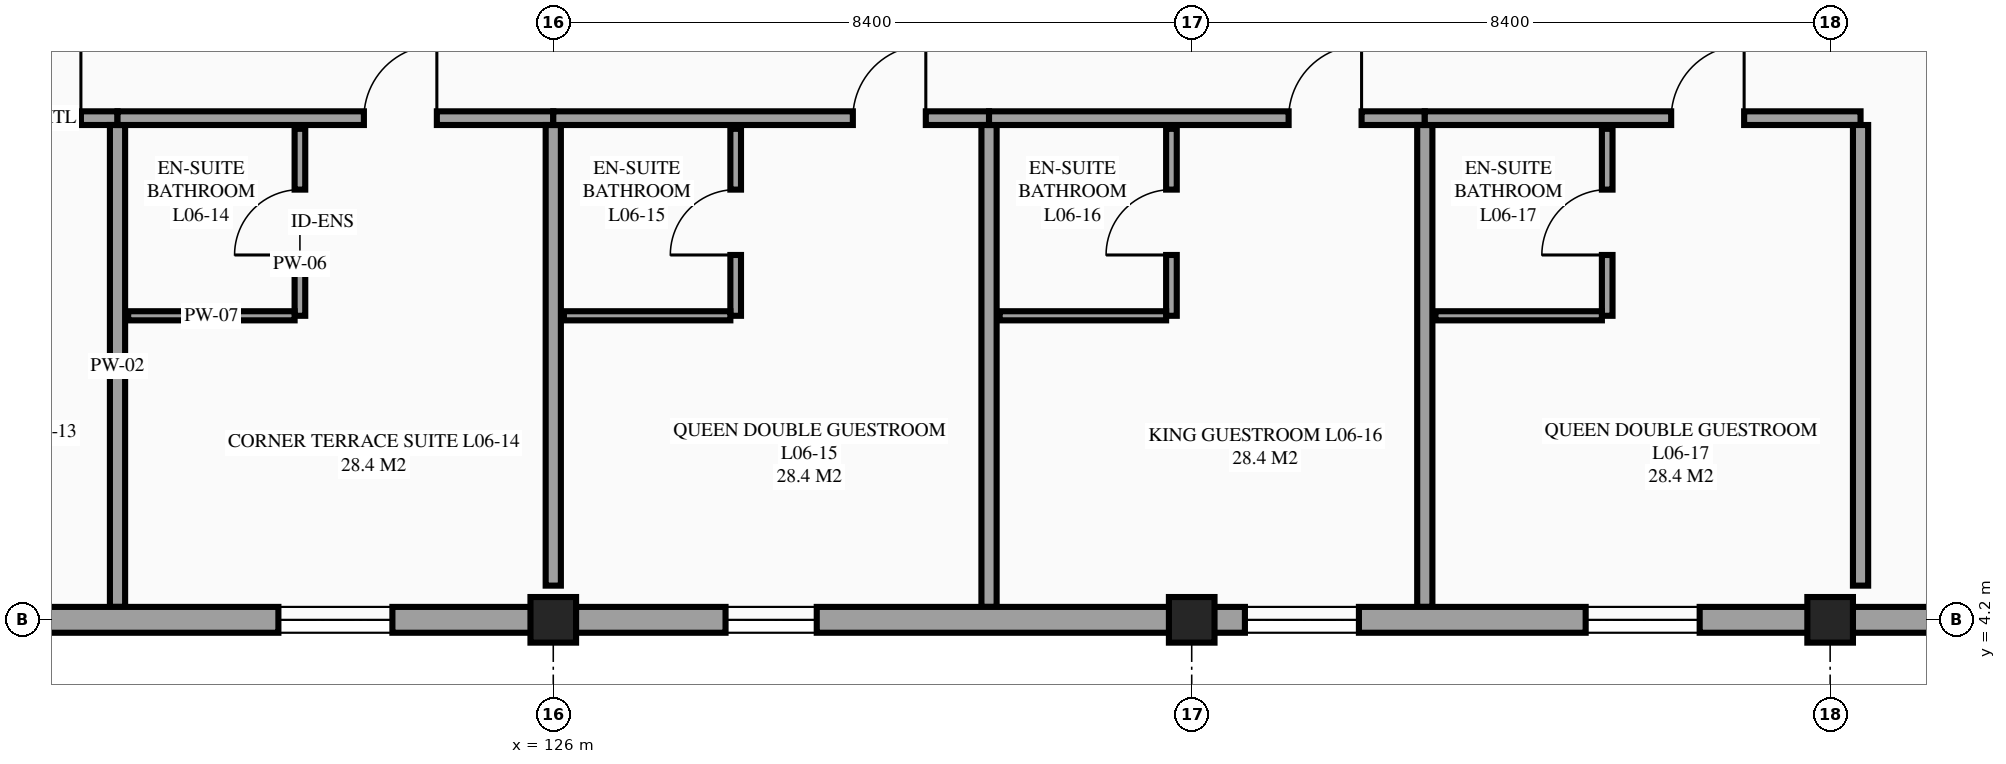
"""IFC4 building model, lengths in metres.
Left out: names, types, materials, properties, quantities, classifications, styles, units other than length and angle.
Written with IfcOpenShell. Run it as: python <this file> out.ifc"""

import sys

from ifc_helpers import new_model, si_unit, direction, frame, frame_2d, origin, origin_2d, place, context, subcontext, project, spatial, rectangle, extrude, element, fill, save


model = new_model("IFC4")
c1 = context("Model", 3, precision=1e-05, world=origin(), true_north=direction((0.0, 1.0)))
c2 = subcontext(c1, "Body", "Model", "MODEL_VIEW")
j1 = project(units=[si_unit("LENGTHUNIT", "METRE"), si_unit("PLANEANGLEUNIT", "RADIAN")], contexts=[c1])
p1 = place(None, origin())
s1 = spatial("IfcSite", under=j1, at=p1, CompositionType="ELEMENT")
p2 = place(p1, origin())
s2 = spatial("IfcBuilding", under=s1, at=p2, CompositionType="ELEMENT")
p3 = place(p2, frame((0.0, 0.0, 25.5)))
s3 = spatial("IfcBuildingStorey", under=s2, at=p3, CompositionType="ELEMENT", Elevation=25.5)
for number, where, z_axis, x_axis in (
    (1, (126.0, 4.2, 0.0), (0.0, 0.0, 1.0), (1.0, 0.0, 0.0)),
    (2, (134.4, 4.2, 0.0), (0.0, 0.0, 1.0), (1.0, 0.0, 0.0)),
    (3, (142.8, 4.2, 0.0), (0.0, 0.0, 1.0), (1.0, 0.0, 0.0)),
):
    element("IfcColumn", number, at=place(p3, frame(where, z_axis=z_axis, x_axis=x_axis)), inside=s3, PredefinedType="COLUMN", context=c2, shape_type="SweptSolid", body=[
        extrude(rectangle(XDim=0.6, YDim=0.6, at=origin_2d()), origin(), (0.0, 0.0, 1.0), 3.6),
    ])
p4 = place(p3, frame((114.533, 10.8, 0.0), z_axis=(0.0, 0.0, 1.0), x_axis=(1.0, 0.0, 0.0)))
e4 = element("IfcWall", 4, at=p4, inside=s3, PredefinedType="PARTITIONING", context=c2, shape_type="SweptSolid", body=[
    extrude(rectangle(XDim=5.733, YDim=0.18, at=frame_2d((2.867, 0.0))), origin(), (0.0, 0.0, 1.0), 3.375),
])
p5 = place(p4, frame((4.292, 0.0, 0.0)))
e5 = element("IfcOpeningElement", 5, at=p5, cuts=e4, PredefinedType="OPENING", context=c2, shape_type="SweptSolid", body=[
    extrude(rectangle(XDim=0.96, YDim=2.15, at=frame_2d((0.48, 1.075))), frame((0.0, 0.1, 0.0), z_axis=(0.0, -1.0, 0.0), x_axis=(1.0, 0.0, 0.0)), (0.0, 0.0, 1.0), 0.2),
])
p6 = place(p3, frame((120.267, 4.37, 0.0), z_axis=(0.0, 0.0, 1.0), x_axis=(0.0, 1.0, 0.0)))
e6 = element("IfcWall", 6, at=p6, inside=s3, PredefinedType="PARTITIONING", context=c2, shape_type="SweptSolid", body=[
    extrude(rectangle(XDim=6.34, YDim=0.2, at=frame_2d((3.17, 0.0))), origin(), (0.0, 0.0, 1.0), 3.375),
])
p7 = place(p3, frame((120.267, 10.8, 0.0), z_axis=(0.0, 0.0, 1.0), x_axis=(1.0, 0.0, 0.0)))
e7 = element("IfcWall", 7, at=p7, inside=s3, PredefinedType="PARTITIONING", context=c2, shape_type="SweptSolid", body=[
    extrude(rectangle(XDim=5.733, YDim=0.18, at=frame_2d((2.867, 0.0))), origin(), (0.0, 0.0, 1.0), 3.375),
])
p8 = place(p7, frame((3.242, 0.0, 0.0)))
e8 = element("IfcOpeningElement", 8, at=p8, cuts=e7, PredefinedType="OPENING", context=c2, shape_type="SweptSolid", body=[
    extrude(rectangle(XDim=0.96, YDim=2.15, at=frame_2d((0.48, 1.075))), frame((0.0, 0.1, 0.0), z_axis=(0.0, -1.0, 0.0), x_axis=(1.0, 0.0, 0.0)), (0.0, 0.0, 1.0), 0.2),
])
p9 = place(p3, frame((126.0, 4.65, 0.0), z_axis=(0.0, 0.0, 1.0), x_axis=(0.0, 1.0, 0.0)))
e9 = element("IfcWall", 9, at=p9, inside=s3, PredefinedType="PARTITIONING", context=c2, shape_type="SweptSolid", body=[
    extrude(rectangle(XDim=6.06, YDim=0.2, at=frame_2d((3.03, 0.0))), origin(), (0.0, 0.0, 1.0), 2.58),
])
p10 = place(p3, frame((122.667, 8.2, 0.0), z_axis=(0.0, 0.0, 1.0), x_axis=(0.0, 1.0, 0.0)))
e10 = element("IfcWall", 10, at=p10, inside=s3, PredefinedType="PARTITIONING", context=c2, shape_type="SweptSolid", body=[
    extrude(rectangle(XDim=2.46, YDim=0.14, at=frame_2d((1.23, 0.0))), origin(), (0.0, 0.0, 1.0), 3.375),
])
p11 = place(p10, frame((0.8, 0.0, 0.0)))
e11 = element("IfcOpeningElement", 11, at=p11, cuts=e10, PredefinedType="OPENING", context=c2, shape_type="SweptSolid", body=[
    extrude(rectangle(XDim=0.86, YDim=2.1, at=frame_2d((0.43, 1.05))), frame((0.0, 0.08, 0.0), z_axis=(0.0, -1.0, 0.0), x_axis=(1.0, 0.0, 0.0)), (0.0, 0.0, 1.0), 0.16),
])
p12 = place(p3, frame((120.407, 8.2, 0.0), z_axis=(0.0, 0.0, 1.0), x_axis=(1.0, 0.0, 0.0)))
e12 = element("IfcWall", 12, at=p12, inside=s3, PredefinedType="PARTITIONING", context=c2, shape_type="SweptSolid", body=[
    extrude(rectangle(XDim=2.19, YDim=0.12, at=frame_2d((1.095, 0.0))), origin(), (0.0, 0.0, 1.0), 3.375),
])
p13 = place(p3, frame((126.0, 10.8, 0.0), z_axis=(0.0, 0.0, 1.0), x_axis=(1.0, 0.0, 0.0)))
e13 = element("IfcWall", 13, at=p13, inside=s3, PredefinedType="PARTITIONING", context=c2, shape_type="SweptSolid", body=[
    extrude(rectangle(XDim=5.733, YDim=0.18, at=frame_2d((2.867, 0.0))), origin(), (0.0, 0.0, 1.0), 3.375),
])
p14 = place(p13, frame((3.942, 0.0, 0.0)))
e14 = element("IfcOpeningElement", 14, at=p14, cuts=e13, PredefinedType="OPENING", context=c2, shape_type="SweptSolid", body=[
    extrude(rectangle(XDim=0.96, YDim=2.15, at=frame_2d((0.48, 1.075))), frame((0.0, 0.1, 0.0), z_axis=(0.0, -1.0, 0.0), x_axis=(1.0, 0.0, 0.0)), (0.0, 0.0, 1.0), 0.2),
])
p15 = place(p3, frame((131.733, 4.37, 0.0), z_axis=(0.0, 0.0, 1.0), x_axis=(0.0, 1.0, 0.0)))
e15 = element("IfcWall", 15, at=p15, inside=s3, PredefinedType="PARTITIONING", context=c2, shape_type="SweptSolid", body=[
    extrude(rectangle(XDim=6.34, YDim=0.2, at=frame_2d((3.17, 0.0))), origin(), (0.0, 0.0, 1.0), 3.375),
])
p16 = place(p3, frame((128.4, 8.2, 0.0), z_axis=(0.0, 0.0, 1.0), x_axis=(0.0, 1.0, 0.0)))
e16 = element("IfcWall", 16, at=p16, inside=s3, PredefinedType="PARTITIONING", context=c2, shape_type="SweptSolid", body=[
    extrude(rectangle(XDim=2.46, YDim=0.14, at=frame_2d((1.23, 0.0))), origin(), (0.0, 0.0, 1.0), 3.375),
])
p17 = place(p16, frame((0.8, 0.0, 0.0)))
e17 = element("IfcOpeningElement", 17, at=p17, cuts=e16, PredefinedType="OPENING", context=c2, shape_type="SweptSolid", body=[
    extrude(rectangle(XDim=0.86, YDim=2.1, at=frame_2d((0.43, 1.05))), frame((0.0, 0.08, 0.0), z_axis=(0.0, -1.0, 0.0), x_axis=(1.0, 0.0, 0.0)), (0.0, 0.0, 1.0), 0.16),
])
p18 = place(p3, frame((126.14, 8.2, 0.0), z_axis=(0.0, 0.0, 1.0), x_axis=(1.0, 0.0, 0.0)))
e18 = element("IfcWall", 18, at=p18, inside=s3, PredefinedType="PARTITIONING", context=c2, shape_type="SweptSolid", body=[
    extrude(rectangle(XDim=2.19, YDim=0.12, at=frame_2d((1.095, 0.0))), origin(), (0.0, 0.0, 1.0), 3.375),
])
p19 = place(p3, frame((131.733, 10.8, 0.0), z_axis=(0.0, 0.0, 1.0), x_axis=(1.0, 0.0, 0.0)))
e19 = element("IfcWall", 19, at=p19, inside=s3, PredefinedType="PARTITIONING", context=c2, shape_type="SweptSolid", body=[
    extrude(rectangle(XDim=5.733, YDim=0.18, at=frame_2d((2.867, 0.0))), origin(), (0.0, 0.0, 1.0), 3.375),
])
p20 = place(p19, frame((3.942, 0.0, 0.0)))
e20 = element("IfcOpeningElement", 20, at=p20, cuts=e19, PredefinedType="OPENING", context=c2, shape_type="SweptSolid", body=[
    extrude(rectangle(XDim=0.96, YDim=2.15, at=frame_2d((0.48, 1.075))), frame((0.0, 0.1, 0.0), z_axis=(0.0, -1.0, 0.0), x_axis=(1.0, 0.0, 0.0)), (0.0, 0.0, 1.0), 0.2),
])
p21 = place(p3, frame((137.467, 4.37, 0.0), z_axis=(0.0, 0.0, 1.0), x_axis=(0.0, 1.0, 0.0)))
e21 = element("IfcWall", 21, at=p21, inside=s3, PredefinedType="PARTITIONING", context=c2, shape_type="SweptSolid", body=[
    extrude(rectangle(XDim=6.34, YDim=0.2, at=frame_2d((3.17, 0.0))), origin(), (0.0, 0.0, 1.0), 3.375),
])
p22 = place(p3, frame((134.133, 8.2, 0.0), z_axis=(0.0, 0.0, 1.0), x_axis=(0.0, 1.0, 0.0)))
e22 = element("IfcWall", 22, at=p22, inside=s3, PredefinedType="PARTITIONING", context=c2, shape_type="SweptSolid", body=[
    extrude(rectangle(XDim=2.46, YDim=0.14, at=frame_2d((1.23, 0.0))), origin(), (0.0, 0.0, 1.0), 3.375),
])
p23 = place(p22, frame((0.8, 0.0, 0.0)))
e23 = element("IfcOpeningElement", 23, at=p23, cuts=e22, PredefinedType="OPENING", context=c2, shape_type="SweptSolid", body=[
    extrude(rectangle(XDim=0.86, YDim=2.1, at=frame_2d((0.43, 1.05))), frame((0.0, 0.08, 0.0), z_axis=(0.0, -1.0, 0.0), x_axis=(1.0, 0.0, 0.0)), (0.0, 0.0, 1.0), 0.16),
])
p24 = place(p3, frame((131.873, 8.2, 0.0), z_axis=(0.0, 0.0, 1.0), x_axis=(1.0, 0.0, 0.0)))
e24 = element("IfcWall", 24, at=p24, inside=s3, PredefinedType="PARTITIONING", context=c2, shape_type="SweptSolid", body=[
    extrude(rectangle(XDim=2.19, YDim=0.12, at=frame_2d((1.095, 0.0))), origin(), (0.0, 0.0, 1.0), 3.375),
])
p25 = place(p3, frame((137.467, 10.8, 0.0), z_axis=(0.0, 0.0, 1.0), x_axis=(1.0, 0.0, 0.0)))
e25 = element("IfcWall", 25, at=p25, inside=s3, PredefinedType="PARTITIONING", context=c2, shape_type="SweptSolid", body=[
    extrude(rectangle(XDim=5.733, YDim=0.18, at=frame_2d((2.867, 0.0))), origin(), (0.0, 0.0, 1.0), 3.375),
])
p26 = place(p25, frame((3.242, 0.0, 0.0)))
e26 = element("IfcOpeningElement", 26, at=p26, cuts=e25, PredefinedType="OPENING", context=c2, shape_type="SweptSolid", body=[
    extrude(rectangle(XDim=0.96, YDim=2.15, at=frame_2d((0.48, 1.075))), frame((0.0, 0.1, 0.0), z_axis=(0.0, -1.0, 0.0), x_axis=(1.0, 0.0, 0.0)), (0.0, 0.0, 1.0), 0.2),
])
p27 = place(p3, frame((143.2, 4.65, 0.0), z_axis=(0.0, 0.0, 1.0), x_axis=(0.0, 1.0, 0.0)))
e27 = element("IfcWall", 27, at=p27, inside=s3, PredefinedType="PARTITIONING", context=c2, shape_type="SweptSolid", body=[
    extrude(rectangle(XDim=6.06, YDim=0.2, at=frame_2d((3.03, 0.0))), origin(), (0.0, 0.0, 1.0), 3.375),
])
p28 = place(p3, frame((139.867, 8.2, 0.0), z_axis=(0.0, 0.0, 1.0), x_axis=(0.0, 1.0, 0.0)))
e28 = element("IfcWall", 28, at=p28, inside=s3, PredefinedType="PARTITIONING", context=c2, shape_type="SweptSolid", body=[
    extrude(rectangle(XDim=2.46, YDim=0.14, at=frame_2d((1.23, 0.0))), origin(), (0.0, 0.0, 1.0), 3.375),
])
p29 = place(p28, frame((0.8, 0.0, 0.0)))
e29 = element("IfcOpeningElement", 29, at=p29, cuts=e28, PredefinedType="OPENING", context=c2, shape_type="SweptSolid", body=[
    extrude(rectangle(XDim=0.86, YDim=2.1, at=frame_2d((0.43, 1.05))), frame((0.0, 0.08, 0.0), z_axis=(0.0, -1.0, 0.0), x_axis=(1.0, 0.0, 0.0)), (0.0, 0.0, 1.0), 0.16),
])
p30 = place(p3, frame((137.607, 8.2, 0.0), z_axis=(0.0, 0.0, 1.0), x_axis=(1.0, 0.0, 0.0)))
e30 = element("IfcWall", 30, at=p30, inside=s3, PredefinedType="PARTITIONING", context=c2, shape_type="SweptSolid", body=[
    extrude(rectangle(XDim=2.19, YDim=0.12, at=frame_2d((1.095, 0.0))), origin(), (0.0, 0.0, 1.0), 3.375),
])
p31 = place(p3, frame((117.6, 4.2, 0.0), z_axis=(0.0, 0.0, 1.0), x_axis=(1.0, 0.0, 0.0)))
e31 = element("IfcWall", 31, at=p31, inside=s3, PredefinedType="STANDARD", context=c2, shape_type="SweptSolid", body=[
    extrude(rectangle(XDim=8.4, YDim=0.34, at=frame_2d((4.2, 0.0))), origin(), (0.0, 0.0, 1.0), 2.63),
])
p32 = place(p31, frame((4.783, 0.0, 0.85)))
e32 = element("IfcOpeningElement", 32, at=p32, cuts=e31, PredefinedType="OPENING", context=c2, shape_type="SweptSolid", body=[
    extrude(rectangle(XDim=1.5, YDim=1.5, at=frame_2d((0.75, 0.75))), frame((0.0, 0.18, 0.0), z_axis=(0.0, -1.0, 0.0), x_axis=(1.0, 0.0, 0.0)), (0.0, 0.0, 1.0), 0.36),
])
p33 = place(p3, frame((126.0, 4.2, 0.0), z_axis=(0.0, 0.0, 1.0), x_axis=(1.0, 0.0, 0.0)))
e33 = element("IfcWall", 33, at=p33, inside=s3, PredefinedType="STANDARD", context=c2, shape_type="SweptSolid", body=[
    extrude(rectangle(XDim=8.4, YDim=0.34, at=frame_2d((4.2, 0.0))), origin(), (0.0, 0.0, 1.0), 2.73),
])
p34 = place(p33, frame((2.267, 0.0, 0.85)))
e34 = element("IfcOpeningElement", 34, at=p34, cuts=e33, PredefinedType="OPENING", context=c2, shape_type="SweptSolid", body=[
    extrude(rectangle(XDim=1.2, YDim=1.5, at=frame_2d((0.6, 0.75))), frame((0.0, 0.18, 0.0), z_axis=(0.0, -1.0, 0.0), x_axis=(1.0, 0.0, 0.0)), (0.0, 0.0, 1.0), 0.36),
])
p35 = place(p3, frame((134.4, 4.2, 0.0), z_axis=(0.0, 0.0, 1.0), x_axis=(1.0, 0.0, 0.0)))
e35 = element("IfcWall", 35, at=p35, inside=s3, PredefinedType="STANDARD", context=c2, shape_type="SweptSolid", body=[
    extrude(rectangle(XDim=8.4, YDim=0.34, at=frame_2d((4.2, 0.0))), origin(), (0.0, 0.0, 1.0), 3.075),
])
p36 = place(p35, frame((0.7, 0.0, 0.85)))
e36 = element("IfcOpeningElement", 36, at=p36, cuts=e35, PredefinedType="OPENING", context=c2, shape_type="SweptSolid", body=[
    extrude(rectangle(XDim=1.5, YDim=1.5, at=frame_2d((0.75, 0.75))), frame((0.0, 0.18, 0.0), z_axis=(0.0, -1.0, 0.0), x_axis=(1.0, 0.0, 0.0)), (0.0, 0.0, 1.0), 0.36),
])
p37 = place(p35, frame((5.183, 0.0, 0.85)))
e37 = element("IfcOpeningElement", 37, at=p37, cuts=e35, PredefinedType="OPENING", context=c2, shape_type="SweptSolid", body=[
    extrude(rectangle(XDim=1.5, YDim=1.5, at=frame_2d((0.75, 0.75))), frame((0.0, 0.18, 0.0), z_axis=(0.0, -1.0, 0.0), x_axis=(1.0, 0.0, 0.0)), (0.0, 0.0, 1.0), 0.36),
])
p38 = place(p3, frame((142.8, 4.2, 0.0), z_axis=(0.0, 0.0, 1.0), x_axis=(1.0, 0.0, 0.0)))
e38 = element("IfcWall", 38, at=p38, inside=s3, PredefinedType="STANDARD", context=c2, shape_type="SweptSolid", body=[
    extrude(rectangle(XDim=8.4, YDim=0.34, at=frame_2d((4.2, 0.0))), origin(), (0.0, 0.0, 1.0), 2.78),
])
p39 = place(p32, origin())
e39 = element("IfcWindow", 39, at=p39, inside=s3, PartitioningType="SINGLE_PANEL", PredefinedType="WINDOW", context=c2, shape_type="SweptSolid", body=[
    extrude(rectangle(XDim=1.5, YDim=1.5, at=frame_2d((0.75, 0.75))), frame((0.0, 0.03, 0.0), z_axis=(0.0, -1.0, 0.0), x_axis=(1.0, 0.0, 0.0)), (0.0, 0.0, 1.0), 0.06),
])
fill(e32, e39)
p40 = place(p34, origin())
e40 = element("IfcWindow", 40, at=p40, inside=s3, PartitioningType="SINGLE_PANEL", PredefinedType="WINDOW", context=c2, shape_type="SweptSolid", body=[
    extrude(rectangle(XDim=1.2, YDim=1.5, at=frame_2d((0.6, 0.75))), frame((0.0, 0.03, 0.0), z_axis=(0.0, -1.0, 0.0), x_axis=(1.0, 0.0, 0.0)), (0.0, 0.0, 1.0), 0.06),
])
fill(e34, e40)
p41 = place(p36, origin())
e41 = element("IfcWindow", 41, at=p41, inside=s3, PartitioningType="SINGLE_PANEL", PredefinedType="WINDOW", context=c2, shape_type="SweptSolid", body=[
    extrude(rectangle(XDim=1.5, YDim=1.5, at=frame_2d((0.75, 0.75))), frame((0.0, 0.03, 0.0), z_axis=(0.0, -1.0, 0.0), x_axis=(1.0, 0.0, 0.0)), (0.0, 0.0, 1.0), 0.06),
])
fill(e36, e41)
p42 = place(p37, origin())
e42 = element("IfcWindow", 42, at=p42, inside=s3, PartitioningType="SINGLE_PANEL", PredefinedType="WINDOW", context=c2, shape_type="SweptSolid", body=[
    extrude(rectangle(XDim=1.5, YDim=1.5, at=frame_2d((0.75, 0.75))), frame((0.0, 0.03, 0.0), z_axis=(0.0, -1.0, 0.0), x_axis=(1.0, 0.0, 0.0)), (0.0, 0.0, 1.0), 0.06),
])
fill(e37, e42)
p43 = place(p5, origin())
e43 = element("IfcDoor", 43, at=p43, inside=s3, OperationType="SINGLE_SWING_RIGHT", PredefinedType="DOOR", context=c2, shape_type="SweptSolid", body=[
    extrude(rectangle(XDim=0.96, YDim=2.15, at=frame_2d((0.48, 1.075))), frame((0.0, 0.025, 0.0), z_axis=(0.0, -1.0, 0.0), x_axis=(1.0, 0.0, 0.0)), (0.0, 0.0, 1.0), 0.05),
])
fill(e5, e43)
p44 = place(p8, origin())
e44 = element("IfcDoor", 44, at=p44, inside=s3, OperationType="SINGLE_SWING_RIGHT", PredefinedType="DOOR", context=c2, shape_type="SweptSolid", body=[
    extrude(rectangle(XDim=0.96, YDim=2.15, at=frame_2d((0.48, 1.075))), frame((0.0, 0.025, 0.0), z_axis=(0.0, -1.0, 0.0), x_axis=(1.0, 0.0, 0.0)), (0.0, 0.0, 1.0), 0.05),
])
fill(e8, e44)
p45 = place(p11, origin())
e45 = element("IfcDoor", 45, at=p45, inside=s3, OperationType="SINGLE_SWING_LEFT", PredefinedType="DOOR", context=c2, shape_type="SweptSolid", body=[
    extrude(rectangle(XDim=0.86, YDim=2.1, at=frame_2d((0.43, 1.05))), frame((0.0, 0.025, 0.0), z_axis=(0.0, -1.0, 0.0), x_axis=(1.0, 0.0, 0.0)), (0.0, 0.0, 1.0), 0.05),
])
fill(e11, e45)
p46 = place(p14, origin())
e46 = element("IfcDoor", 46, at=p46, inside=s3, OperationType="SINGLE_SWING_RIGHT", PredefinedType="DOOR", context=c2, shape_type="SweptSolid", body=[
    extrude(rectangle(XDim=0.96, YDim=2.15, at=frame_2d((0.48, 1.075))), frame((0.0, 0.025, 0.0), z_axis=(0.0, -1.0, 0.0), x_axis=(1.0, 0.0, 0.0)), (0.0, 0.0, 1.0), 0.05),
])
fill(e14, e46)
p47 = place(p17, origin())
e47 = element("IfcDoor", 47, at=p47, inside=s3, OperationType="SINGLE_SWING_LEFT", PredefinedType="DOOR", context=c2, shape_type="SweptSolid", body=[
    extrude(rectangle(XDim=0.86, YDim=2.1, at=frame_2d((0.43, 1.05))), frame((0.0, 0.025, 0.0), z_axis=(0.0, -1.0, 0.0), x_axis=(1.0, 0.0, 0.0)), (0.0, 0.0, 1.0), 0.05),
])
fill(e17, e47)
p48 = place(p20, origin())
e48 = element("IfcDoor", 48, at=p48, inside=s3, OperationType="SINGLE_SWING_RIGHT", PredefinedType="DOOR", context=c2, shape_type="SweptSolid", body=[
    extrude(rectangle(XDim=0.96, YDim=2.15, at=frame_2d((0.48, 1.075))), frame((0.0, 0.025, 0.0), z_axis=(0.0, -1.0, 0.0), x_axis=(1.0, 0.0, 0.0)), (0.0, 0.0, 1.0), 0.05),
])
fill(e20, e48)
p49 = place(p23, origin())
e49 = element("IfcDoor", 49, at=p49, inside=s3, OperationType="SINGLE_SWING_LEFT", PredefinedType="DOOR", context=c2, shape_type="SweptSolid", body=[
    extrude(rectangle(XDim=0.86, YDim=2.1, at=frame_2d((0.43, 1.05))), frame((0.0, 0.025, 0.0), z_axis=(0.0, -1.0, 0.0), x_axis=(1.0, 0.0, 0.0)), (0.0, 0.0, 1.0), 0.05),
])
fill(e23, e49)
p50 = place(p26, origin())
e50 = element("IfcDoor", 50, at=p50, inside=s3, OperationType="SINGLE_SWING_RIGHT", PredefinedType="DOOR", context=c2, shape_type="SweptSolid", body=[
    extrude(rectangle(XDim=0.96, YDim=2.15, at=frame_2d((0.48, 1.075))), frame((0.0, 0.025, 0.0), z_axis=(0.0, -1.0, 0.0), x_axis=(1.0, 0.0, 0.0)), (0.0, 0.0, 1.0), 0.05),
])
fill(e26, e50)
p51 = place(p29, origin())
e51 = element("IfcDoor", 51, at=p51, inside=s3, OperationType="SINGLE_SWING_LEFT", PredefinedType="DOOR", context=c2, shape_type="SweptSolid", body=[
    extrude(rectangle(XDim=0.86, YDim=2.1, at=frame_2d((0.43, 1.05))), frame((0.0, 0.025, 0.0), z_axis=(0.0, -1.0, 0.0), x_axis=(1.0, 0.0, 0.0)), (0.0, 0.0, 1.0), 0.05),
])
fill(e29, e51)
save(model, sys.argv[1])
